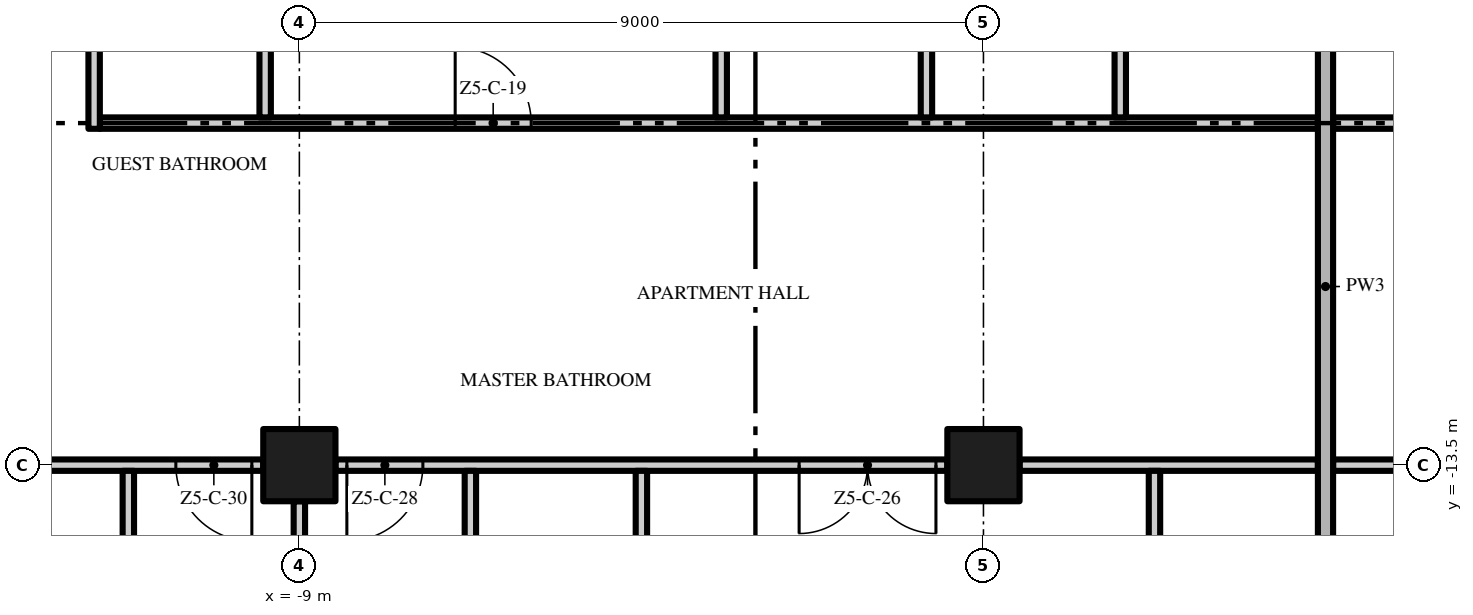
"""IFC4 building model, lengths in metres.
Left out: names, types, materials, properties, quantities, classifications, styles, units other than length and angle.
Written with IfcOpenShell. Run it as: python <this file> out.ifc"""

import sys

from ifc_helpers import new_model, si_unit, direction, frame, frame_2d, origin, origin_2d, place, context, subcontext, project, spatial, rectangle, extrude, element, fill, save


model = new_model("IFC4")
c1 = context("Model", 3, precision=1e-05, world=origin(), true_north=direction((0.0, 1.0)))
c2 = subcontext(c1, "Body", "Model", "MODEL_VIEW")
j1 = project(units=[si_unit("LENGTHUNIT", "METRE"), si_unit("PLANEANGLEUNIT", "RADIAN")], contexts=[c1])
p1 = place(None, origin())
s1 = spatial("IfcSite", under=j1, at=p1, CompositionType="ELEMENT")
p2 = place(p1, origin())
s2 = spatial("IfcBuilding", under=s1, at=p2, CompositionType="ELEMENT")
p3 = place(p2, frame((0.0, 0.0, 265.4)))
s3 = spatial("IfcBuildingStorey", under=s2, at=p3, CompositionType="ELEMENT", Elevation=265.4)
for number, where, z_axis, x_axis in (
    (1, (-9.0, -13.5, 0.0), (0.0, 0.0, 1.0), (1.0, 0.0, 0.0)),
    (2, (0.0, -13.5, 0.0), (0.0, 0.0, 1.0), (1.0, 0.0, 0.0)),
):
    element("IfcColumn", number, at=place(p3, frame(where, z_axis=z_axis, x_axis=x_axis)), inside=s3, PredefinedType="COLUMN", context=c2, shape_type="SweptSolid", body=[
        extrude(rectangle(XDim=0.95, YDim=0.95, at=origin_2d()), origin(), (0.0, 0.0, 1.0), 3.5),
    ])
p4 = place(p3, frame((-9.475, -13.5, 0.0), z_axis=(0.0, 0.0, 1.0), x_axis=(-1.0, 0.0, 0.0)))
e3 = element("IfcWall", 3, at=p4, inside=s3, PredefinedType="PARTITIONING", context=c2, shape_type="SweptSolid", body=[
    extrude(rectangle(XDim=8.05, YDim=0.15, at=frame_2d((4.025, 0.0))), origin(), (0.0, 0.0, 1.0), 3.5),
])
p5 = place(p4, frame((0.15, 0.0, 0.0)))
e4 = element("IfcOpeningElement", 4, at=p5, cuts=e3, PredefinedType="OPENING", context=c2, shape_type="SweptSolid", body=[
    extrude(rectangle(XDim=1.0, YDim=2.4, at=frame_2d((0.5, 1.2))), frame((0.0, 0.085, 0.0), z_axis=(0.0, -1.0, 0.0), x_axis=(1.0, 0.0, 0.0)), (0.0, 0.0, 1.0), 0.17),
])
p6 = place(p4, frame((6.9, 0.0, 0.0)))
e5 = element("IfcOpeningElement", 5, at=p6, cuts=e3, PredefinedType="OPENING", context=c2, shape_type="SweptSolid", body=[
    extrude(rectangle(XDim=1.0, YDim=2.4, at=frame_2d((0.5, 1.2))), frame((0.0, 0.085, 0.0), z_axis=(0.0, -1.0, 0.0), x_axis=(1.0, 0.0, 0.0)), (0.0, 0.0, 1.0), 0.17),
])
p7 = place(p3, frame((-0.475, -13.5, 0.0), z_axis=(0.0, 0.0, 1.0), x_axis=(-1.0, 0.0, 0.0)))
e6 = element("IfcWall", 6, at=p7, inside=s3, PredefinedType="PARTITIONING", context=c2, shape_type="SweptSolid", body=[
    extrude(rectangle(XDim=8.05, YDim=0.15, at=frame_2d((4.025, 0.0))), origin(), (0.0, 0.0, 1.0), 3.5),
])
p8 = place(p7, frame((0.15, 0.0, 0.0)))
e7 = element("IfcOpeningElement", 7, at=p8, cuts=e6, PredefinedType="OPENING", context=c2, shape_type="SweptSolid", body=[
    extrude(rectangle(XDim=1.8, YDim=2.4, at=frame_2d((0.9, 1.2))), frame((0.0, 0.085, 0.0), z_axis=(0.0, -1.0, 0.0), x_axis=(1.0, 0.0, 0.0)), (0.0, 0.0, 1.0), 0.17),
])
p9 = place(p7, frame((6.9, 0.0, 0.0)))
e8 = element("IfcOpeningElement", 8, at=p9, cuts=e6, PredefinedType="OPENING", context=c2, shape_type="SweptSolid", body=[
    extrude(rectangle(XDim=1.0, YDim=2.4, at=frame_2d((0.5, 1.2))), frame((0.0, 0.085, 0.0), z_axis=(0.0, -1.0, 0.0), x_axis=(1.0, 0.0, 0.0)), (0.0, 0.0, 1.0), 0.17),
])
for number, where, z_axis, x_axis in (
    (9, (0.475, -13.5, 0.0), (0.0, 0.0, 1.0), (1.0, 0.0, 0.0)),
    (10, (4.6, -13.5, 0.0), (0.0, 0.0, 1.0), (1.0, 0.0, 0.0)),
):
    element("IfcWall", number, at=place(p3, frame(where, z_axis=z_axis, x_axis=x_axis)), inside=s3, PredefinedType="PARTITIONING", context=c2, shape_type="SweptSolid", body=[
        extrude(rectangle(XDim=3.925, YDim=0.15, at=frame_2d((1.962, 0.0))), origin(), (0.0, 0.0, 1.0), 3.5),
    ])
p10 = place(p3, frame((-11.625, -9.0, 0.0), z_axis=(0.0, 0.0, 1.0), x_axis=(1.0, 0.0, 0.0)))
e11 = element("IfcWall", 11, at=p10, inside=s3, PredefinedType="PARTITIONING", context=c2, shape_type="SweptSolid", body=[
    extrude(rectangle(XDim=16.025, YDim=0.15, at=frame_2d((8.012, 0.0))), origin(), (0.0, 0.0, 1.0), 3.5),
])
p11 = place(p10, frame((4.675, 0.0, 0.0)))
e12 = element("IfcOpeningElement", 12, at=p11, cuts=e11, PredefinedType="OPENING", context=c2, shape_type="SweptSolid", body=[
    extrude(rectangle(XDim=1.0, YDim=2.4, at=frame_2d((0.5, 1.2))), frame((0.0, 0.085, 0.0), z_axis=(0.0, -1.0, 0.0), x_axis=(1.0, 0.0, 0.0)), (0.0, 0.0, 1.0), 0.17),
])
p12 = place(p3, frame((4.6, -9.0, 0.0), z_axis=(0.0, 0.0, 1.0), x_axis=(1.0, 0.0, 0.0)))
e13 = element("IfcWall", 13, at=p12, inside=s3, PredefinedType="PARTITIONING", context=c2, shape_type="SweptSolid", body=[
    extrude(rectangle(XDim=10.025, YDim=0.15, at=frame_2d((5.013, 0.0))), origin(), (0.0, 0.0, 1.0), 3.5),
])
p13 = place(p12, frame((4.35, 0.0, 0.0)))
e14 = element("IfcOpeningElement", 14, at=p13, cuts=e13, PredefinedType="OPENING", context=c2, shape_type="SweptSolid", body=[
    extrude(rectangle(XDim=1.0, YDim=2.4, at=frame_2d((0.5, 1.2))), frame((0.0, 0.085, 0.0), z_axis=(0.0, -1.0, 0.0), x_axis=(1.0, 0.0, 0.0)), (0.0, 0.0, 1.0), 0.17),
])
p14 = place(p3, frame((-11.7, -4.425, 0.0), z_axis=(0.0, 0.0, 1.0), x_axis=(0.0, -1.0, 0.0)))
e15 = element("IfcWall", 15, at=p14, inside=s3, PredefinedType="PARTITIONING", context=c2, shape_type="SweptSolid", body=[
    extrude(rectangle(XDim=4.65, YDim=0.15, at=frame_2d((2.325, 0.0))), origin(), (0.0, 0.0, 1.0), 3.5),
])
p15 = place(p14, frame((1.875, 0.0, 0.0)))
e16 = element("IfcOpeningElement", 16, at=p15, cuts=e15, PredefinedType="OPENING", context=c2, shape_type="SweptSolid", body=[
    extrude(rectangle(XDim=0.9, YDim=2.1, at=frame_2d((0.45, 1.05))), frame((0.0, 0.085, 0.0), z_axis=(0.0, -1.0, 0.0), x_axis=(1.0, 0.0, 0.0)), (0.0, 0.0, 1.0), 0.17),
])
p16 = place(p3, frame((-11.25, -16.575, 0.0), z_axis=(0.0, 0.0, 1.0), x_axis=(0.0, 1.0, 0.0)))
e17 = element("IfcWall", 17, at=p16, inside=s3, PredefinedType="PARTITIONING", context=c2, shape_type="SweptSolid", body=[
    extrude(rectangle(XDim=3.0, YDim=0.15, at=frame_2d((1.5, 0.0))), origin(), (0.0, 0.0, 1.0), 3.5),
])
p17 = place(p3, frame((-9.45, -8.925, 0.0), z_axis=(0.0, 0.0, 1.0), x_axis=(0.0, 1.0, 0.0)))
e18 = element("IfcWall", 18, at=p17, inside=s3, PredefinedType="PARTITIONING", context=c2, shape_type="SweptSolid", body=[
    extrude(rectangle(XDim=3.95, YDim=0.15, at=frame_2d((1.975, 0.0))), origin(), (0.0, 0.0, 1.0), 3.5),
])
p18 = place(p3, frame((-9.0, -21.6, 0.0), z_axis=(0.0, 0.0, 1.0), x_axis=(0.0, 1.0, 0.0)))
e19 = element("IfcWall", 19, at=p18, inside=s3, PredefinedType="PARTITIONING", context=c2, shape_type="SweptSolid", body=[
    extrude(rectangle(XDim=7.625, YDim=0.15, at=frame_2d((3.812, 0.0))), origin(), (0.0, 0.0, 1.0), 3.5),
])
p19 = place(p3, frame((-6.75, -16.575, 0.0), z_axis=(0.0, 0.0, 1.0), x_axis=(0.0, 1.0, 0.0)))
e20 = element("IfcWall", 20, at=p19, inside=s3, PredefinedType="PARTITIONING", context=c2, shape_type="SweptSolid", body=[
    extrude(rectangle(XDim=3.0, YDim=0.15, at=frame_2d((1.5, 0.0))), origin(), (0.0, 0.0, 1.0), 3.5),
])
p20 = place(p3, frame((-4.5, -22.2, 0.0), z_axis=(0.0, 0.0, 1.0), x_axis=(0.0, 1.0, 0.0)))
e21 = element("IfcWall", 21, at=p20, inside=s3, PredefinedType="PARTITIONING", context=c2, shape_type="SweptSolid", body=[
    extrude(rectangle(XDim=8.625, YDim=0.15, at=frame_2d((4.312, 0.0))), origin(), (0.0, 0.0, 1.0), 3.5),
])
for number, where, z_axis, x_axis in (
    (22, (-3.45, -8.925, 0.0), (0.0, 0.0, 1.0), (0.0, 1.0, 0.0)),
    (23, (-0.75, -8.925, 0.0), (0.0, 0.0, 1.0), (0.0, 1.0, 0.0)),
    (24, (1.8, -8.925, 0.0), (0.0, 0.0, 1.0), (0.0, 1.0, 0.0)),
):
    element("IfcWall", number, at=place(p3, frame(where, z_axis=z_axis, x_axis=x_axis)), inside=s3, PredefinedType="PARTITIONING", context=c2, shape_type="SweptSolid", body=[
        extrude(rectangle(XDim=4.35, YDim=0.15, at=frame_2d((2.175, 0.0))), origin(), (0.0, 0.0, 1.0), 3.5),
    ])
p21 = place(p3, frame((2.25, -16.575, 0.0), z_axis=(0.0, 0.0, 1.0), x_axis=(0.0, 1.0, 0.0)))
e25 = element("IfcWall", 25, at=p21, inside=s3, PredefinedType="PARTITIONING", context=c2, shape_type="SweptSolid", body=[
    extrude(rectangle(XDim=3.0, YDim=0.15, at=frame_2d((1.5, 0.0))), origin(), (0.0, 0.0, 1.0), 3.5),
])
p22 = place(p3, frame((4.5, -22.2, 0.0), z_axis=(0.0, 0.0, 1.0), x_axis=(0.0, 1.0, 0.0)))
e26 = element("IfcWall", 26, at=p22, inside=s3, PredefinedType="PARTITIONING", context=c2, shape_type="SweptSolid", body=[
    extrude(rectangle(XDim=22.1, YDim=0.2, at=frame_2d((11.05, 0.0))), origin(), (0.0, 0.0, 1.0), 3.5),
])
p23 = place(p11, origin())
e27 = element("IfcDoor", 27, at=p23, inside=s3, OperationType="SINGLE_SWING_LEFT", PredefinedType="DOOR", context=c2, shape_type="SweptSolid", body=[
    extrude(rectangle(XDim=1.0, YDim=2.4, at=frame_2d((0.5, 1.2))), frame((0.0, 0.025, 0.0), z_axis=(0.0, -1.0, 0.0), x_axis=(1.0, 0.0, 0.0)), (0.0, 0.0, 1.0), 0.05),
])
fill(e12, e27)
p24 = place(p8, origin())
e28 = element("IfcDoor", 28, at=p24, inside=s3, OperationType="DOUBLE_DOOR_SINGLE_SWING", PredefinedType="DOOR", context=c2, shape_type="SweptSolid", body=[
    extrude(rectangle(XDim=1.8, YDim=2.4, at=frame_2d((0.9, 1.2))), frame((0.0, 0.025, 0.0), z_axis=(0.0, -1.0, 0.0), x_axis=(1.0, 0.0, 0.0)), (0.0, 0.0, 1.0), 0.05),
])
fill(e7, e28)
p25 = place(p9, origin())
e29 = element("IfcDoor", 29, at=p25, inside=s3, OperationType="SINGLE_SWING_RIGHT", PredefinedType="DOOR", context=c2, shape_type="SweptSolid", body=[
    extrude(rectangle(XDim=1.0, YDim=2.4, at=frame_2d((0.5, 1.2))), frame((0.0, 0.025, 0.0), z_axis=(0.0, -1.0, 0.0), x_axis=(1.0, 0.0, 0.0)), (0.0, 0.0, 1.0), 0.05),
])
fill(e8, e29)
p26 = place(p5, origin())
e30 = element("IfcDoor", 30, at=p26, inside=s3, OperationType="SINGLE_SWING_LEFT", PredefinedType="DOOR", context=c2, shape_type="SweptSolid", body=[
    extrude(rectangle(XDim=1.0, YDim=2.4, at=frame_2d((0.5, 1.2))), frame((0.0, 0.025, 0.0), z_axis=(0.0, -1.0, 0.0), x_axis=(1.0, 0.0, 0.0)), (0.0, 0.0, 1.0), 0.05),
])
fill(e4, e30)
save(model, sys.argv[1])
